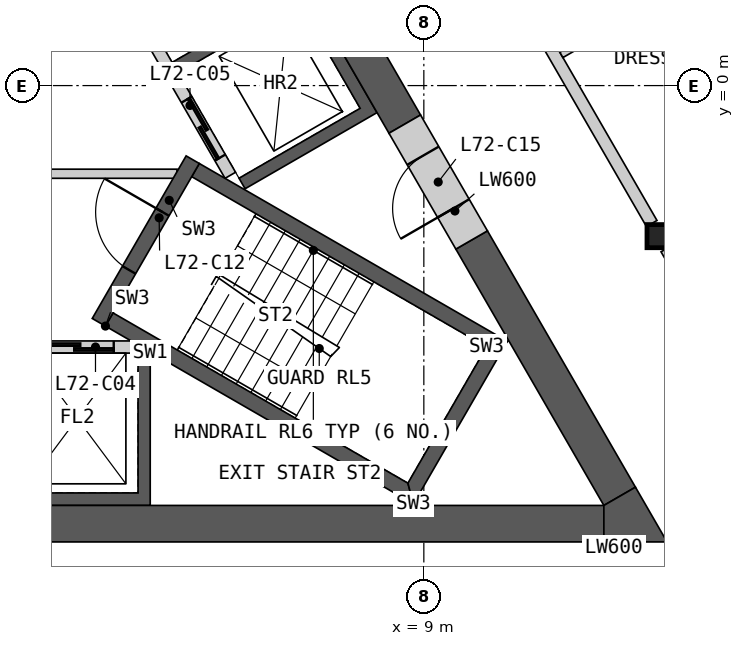
"""IFC4 building model, lengths in metres.
Left out: names, types, materials, properties, quantities, classifications, styles, units other than length and angle.
Written with IfcOpenShell. Run it as: python <this file> out.ifc"""

import sys

from ifc_helpers import new_model, si_unit, direction, frame, frame_2d, origin, origin_2d, place, context, subcontext, project, spatial, polyline, rectangle, i_section, outline, extrude, element, fill, save


model = new_model("IFC4")
c1 = context("Model", 3, precision=1e-05, world=origin(), true_north=direction((0.0, 1.0)))
c2 = subcontext(c1, "Body", "Model", "MODEL_VIEW")
j1 = project(units=[si_unit("LENGTHUNIT", "METRE"), si_unit("PLANEANGLEUNIT", "RADIAN")], contexts=[c1])
p1 = place(None, origin())
s1 = spatial("IfcSite", under=j1, at=p1, CompositionType="ELEMENT")
p2 = place(p1, origin())
s2 = spatial("IfcBuilding", under=s1, at=p2, CompositionType="ELEMENT")
p3 = place(p2, frame((0.0, 0.0, 325.6)))
s3 = spatial("IfcBuildingStorey", under=s2, at=p3, CompositionType="ELEMENT", Elevation=325.6)
p4 = place(p3, frame((12.868, -2.476, 0.0), z_axis=(0.0, 0.0, 1.0), x_axis=(1.0, 0.0, 0.0)))
e1 = element("IfcColumn", 1, at=p4, inside=s3, PredefinedType="COLUMN", context=c2, shape_type="SweptSolid", body=[
    extrude(i_section(OverallWidth=0.396, OverallDepth=0.381, WebThickness=0.019, FlangeThickness=0.03, at=origin_2d()), origin(), (0.0, 0.0, 1.0), 3.4),
])
p5 = place(p3, origin())
e2 = element("IfcWall", 2, at=p5, inside=s3, PredefinedType="SHEAR", context=c2, shape_type="SweptSolid", body=[
    extrude(outline(polyline([(4.5, -4.4), (4.5, -6.906), (-4.5, -6.906), (-4.5, -4.4), (-4.3, -4.4), (-4.3, -6.7), (-2.3, -6.7), (-2.3, -4.4), (-2.1, -4.4), (-2.1, -6.7), (-0.1, -6.7), (-0.1, -4.4), (0.1, -4.4), (0.1, -6.7), (2.1, -6.7), (2.1, -4.4), (2.3, -4.4), (2.3, -6.7), (4.3, -6.7), (4.3, -4.4), (4.5, -4.4)])), origin(), (0.0, 0.0, 1.0), 3.1),
])
p6 = place(p3, frame((-4.187, -4.3, 0.0), z_axis=(0.0, 0.0, 1.0), x_axis=(1.0, 0.0, 0.0)))
e3 = element("IfcWall", 3, at=p6, inside=s3, PredefinedType="SOLIDWALL", context=c2, shape_type="SweptSolid", body=[
    extrude(rectangle(XDim=8.373, YDim=0.2, at=frame_2d((4.187, 0.0))), origin(), (0.0, 0.0, 1.0), 3.1),
])
p7 = place(p6, frame((0.287, 0.0, 0.0)))
e4 = element("IfcOpeningElement", 4, at=p7, cuts=e3, PredefinedType="OPENING", context=c2, shape_type="SweptSolid", body=[
    extrude(rectangle(XDim=1.2, YDim=2.1, at=frame_2d((0.6, 1.05))), frame((0.0, 0.11, 0.0), z_axis=(0.0, -1.0, 0.0), x_axis=(1.0, 0.0, 0.0)), (0.0, 0.0, 1.0), 0.22),
])
p8 = place(p6, frame((2.387, 0.0, 0.0)))
e5 = element("IfcOpeningElement", 5, at=p8, cuts=e3, PredefinedType="OPENING", context=c2, shape_type="SweptSolid", body=[
    extrude(rectangle(XDim=1.4, YDim=2.1, at=frame_2d((0.7, 1.05))), frame((0.0, 0.11, 0.0), z_axis=(0.0, -1.0, 0.0), x_axis=(1.0, 0.0, 0.0)), (0.0, 0.0, 1.0), 0.22),
])
p9 = place(p6, frame((4.737, 0.0, 0.0)))
e6 = element("IfcOpeningElement", 6, at=p9, cuts=e3, PredefinedType="OPENING", context=c2, shape_type="SweptSolid", body=[
    extrude(rectangle(XDim=1.1, YDim=2.1, at=frame_2d((0.55, 1.05))), frame((0.0, 0.11, 0.0), z_axis=(0.0, -1.0, 0.0), x_axis=(1.0, 0.0, 0.0)), (0.0, 0.0, 1.0), 0.22),
])
p10 = place(p6, frame((6.887, 0.0, 0.0)))
e7 = element("IfcOpeningElement", 7, at=p10, cuts=e3, PredefinedType="OPENING", context=c2, shape_type="SweptSolid", body=[
    extrude(rectangle(XDim=1.2, YDim=2.1, at=frame_2d((0.6, 1.05))), frame((0.0, 0.11, 0.0), z_axis=(0.0, -1.0, 0.0), x_axis=(1.0, 0.0, 0.0)), (0.0, 0.0, 1.0), 0.22),
])
p11 = place(p3, origin())
e8 = element("IfcWall", 8, at=p11, inside=s3, PredefinedType="SHEAR", context=c2, shape_type="SweptSolid", body=[
    extrude(outline(polyline([(1.561, 6.097), (3.731, 7.35), (8.231, -0.444), (6.061, -1.697), (5.96, -1.524), (7.952, -0.374), (6.952, 1.358), (4.96, 0.208), (4.861, 0.381), (6.852, 1.531), (5.852, 3.263), (3.861, 2.113), (3.76, 2.287), (5.752, 3.437), (4.752, 5.169), (2.76, 4.019), (2.66, 4.192), (4.652, 5.342), (3.652, 7.074), (1.66, 5.924), (1.561, 6.097)])), origin(), (0.0, 0.0, 1.0), 3.1),
])
p12 = place(p3, frame((5.817, -1.476, 0.0), z_axis=(0.0, 0.0, 1.0), x_axis=(-0.500002616675, 0.866023893041, 0.0)))
e9 = element("IfcWall", 9, at=p12, inside=s3, PredefinedType="SOLIDWALL", context=c2, shape_type="SweptSolid", body=[
    extrude(rectangle(XDim=8.373, YDim=0.2, at=frame_2d((4.187, 0.0))), origin(), (0.0, 0.0, 1.0), 3.1),
])
p13 = place(p12, frame((0.337, 0.0, 0.0)))
e10 = element("IfcOpeningElement", 10, at=p13, cuts=e9, PredefinedType="OPENING", context=c2, shape_type="SweptSolid", body=[
    extrude(rectangle(XDim=1.1, YDim=2.1, at=frame_2d((0.55, 1.05))), frame((0.0, 0.11, 0.0), z_axis=(0.0, -1.0, 0.0), x_axis=(1.0, 0.0, 0.0)), (0.0, 0.0, 1.0), 0.22),
])
p14 = place(p12, frame((2.537, 0.0, 0.0)))
e11 = element("IfcOpeningElement", 11, at=p14, cuts=e9, PredefinedType="OPENING", context=c2, shape_type="SweptSolid", body=[
    extrude(rectangle(XDim=1.1, YDim=2.1, at=frame_2d((0.55, 1.05))), frame((0.0, 0.11, 0.0), z_axis=(0.0, -1.0, 0.0), x_axis=(1.0, 0.0, 0.0)), (0.0, 0.0, 1.0), 0.22),
])
p15 = place(p12, frame((4.737, 0.0, 0.0)))
e12 = element("IfcOpeningElement", 12, at=p15, cuts=e9, PredefinedType="OPENING", context=c2, shape_type="SweptSolid", body=[
    extrude(rectangle(XDim=1.1, YDim=2.1, at=frame_2d((0.55, 1.05))), frame((0.0, 0.11, 0.0), z_axis=(0.0, -1.0, 0.0), x_axis=(1.0, 0.0, 0.0)), (0.0, 0.0, 1.0), 0.22),
])
p16 = place(p12, frame((7.037, 0.0, 0.0)))
e13 = element("IfcOpeningElement", 13, at=p16, cuts=e9, PredefinedType="OPENING", context=c2, shape_type="SweptSolid", body=[
    extrude(rectangle(XDim=0.9, YDim=2.1, at=frame_2d((0.45, 1.05))), frame((0.0, 0.11, 0.0), z_axis=(0.0, -1.0, 0.0), x_axis=(1.0, 0.0, 0.0)), (0.0, 0.0, 1.0), 0.22),
])
p17 = place(p3, frame((-4.941, -1.45, 0.0), z_axis=(0.0, 0.0, 1.0), x_axis=(1.0, 0.0, 0.0)))
e14 = element("IfcWall", 14, at=p17, inside=s3, PredefinedType="PARTITIONING", context=c2, shape_type="SweptSolid", body=[
    extrude(rectangle(XDim=9.882, YDim=0.15, at=frame_2d((4.941, 0.0))), origin(), (0.0, 0.0, 1.0), 3.1),
])
p18 = place(p17, frame((4.391, 0.0, 0.0)))
e15 = element("IfcOpeningElement", 15, at=p18, cuts=e14, PredefinedType="OPENING", context=c2, shape_type="SweptSolid", body=[
    extrude(rectangle(XDim=1.1, YDim=2.1, at=frame_2d((0.55, 1.05))), frame((0.0, 0.085, 0.0), z_axis=(0.0, -1.0, 0.0), x_axis=(1.0, 0.0, 0.0)), (0.0, 0.0, 1.0), 0.17),
])
p19 = place(p3, origin())
e16 = element("IfcWall", 16, at=p19, inside=s3, PredefinedType="SHEAR", context=c2, shape_type="SweptSolid", body=[
    extrude(outline(polyline([(3.763, -3.956), (8.83, -6.881), (8.738, -6.539), (3.888, -3.739), (3.763, -3.956)])), origin(), (0.0, 0.0, 1.0), 3.1),
])
p20 = place(p3, origin())
e17 = element("IfcWall", 17, at=p20, inside=s3, PredefinedType="SHEAR", context=c2, shape_type="SweptSolid", body=[
    extrude(outline(polyline([(8.83, -6.881), (10.374, -4.206), (10.032, -4.298), (8.738, -6.539), (8.83, -6.881)])), origin(), (0.0, 0.0, 1.0), 3.1),
])
p21 = place(p3, origin())
e18 = element("IfcWall", 18, at=p21, inside=s3, PredefinedType="SHEAR", context=c2, shape_type="SweptSolid", body=[
    extrude(outline(polyline([(10.032, -4.298), (10.374, -4.206), (5.307, -1.281), (5.182, -1.498), (10.032, -4.298)])), origin(), (0.0, 0.0, 1.0), 3.1),
])
p22 = place(p3, frame((3.655, -3.893, 0.0), z_axis=(0.0, 0.0, 1.0), x_axis=(0.499982516597, 0.866035497597, 0.0)))
e19 = element("IfcWall", 19, at=p22, inside=s3, PredefinedType="SHEAR", context=c2, shape_type="SweptSolid", body=[
    extrude(rectangle(XDim=3.088, YDim=0.25, at=frame_2d((1.544, 0.0))), origin(), (0.0, 0.0, 1.0), 3.1),
])
p23 = place(p22, frame((0.994, 0.0, 0.0)))
e20 = element("IfcOpeningElement", 20, at=p23, cuts=e19, PredefinedType="OPENING", context=c2, shape_type="SweptSolid", body=[
    extrude(rectangle(XDim=1.1, YDim=2.1, at=frame_2d((0.55, 1.05))), frame((0.0, 0.135, 0.0), z_axis=(0.0, -1.0, 0.0), x_axis=(1.0, 0.0, 0.0)), (0.0, 0.0, 1.0), 0.27),
])
for number, where, z_axis, x_axis in (
    (21, (-4.892, -7.206, 0.0), (0.0, 0.0, 1.0), (1.0, 0.0, 0.0)),
    (22, (8.686, -0.634, 0.0), (0.0, 0.0, 1.0), (-0.5, 0.866, 0.0)),
):
    element("IfcWall", number, at=place(p3, frame(where, z_axis=z_axis, x_axis=x_axis)), inside=s3, PredefinedType="SHEAR", context=c2, shape_type="SweptSolid", body=[
        extrude(rectangle(XDim=16.853, YDim=0.6, at=frame_2d((8.426, 0.0))), origin(), (0.0, 0.0, 1.0), 3.1),
    ])
p24 = place(p3, frame((12.221, -6.756, 0.0), z_axis=(0.0, 0.0, 1.0), x_axis=(-0.50000604952, 0.866021911064, 0.0)))
e23 = element("IfcWall", 23, at=p24, inside=s3, PredefinedType="SHEAR", context=c2, shape_type="SweptSolid", body=[
    extrude(rectangle(XDim=4.869, YDim=0.6, at=frame_2d((2.434, 0.0))), origin(), (0.0, 0.0, 1.0), 3.1),
])
p25 = place(p3, origin())
e24 = element("IfcWall", 24, at=p25, inside=s3, PredefinedType="SHEAR", context=c2, shape_type="SweptSolid", body=[
    extrude(outline(polyline([(11.961, -7.506), (11.961, -6.906), (12.48, -6.606), (13.0, -7.506), (11.961, -7.506)])), origin(), (0.0, 0.0, 1.0), 3.1),
])
p26 = place(p3, frame((9.786, -2.539, 0.0), z_axis=(0.0, 0.0, 1.0), x_axis=(-0.499981787252, 0.866035918664, 0.0)))
e25 = element("IfcWall", 25, at=p26, inside=s3, PredefinedType="SHEAR", context=c2, shape_type="SweptSolid", body=[
    extrude(rectangle(XDim=2.2, YDim=0.6, at=frame_2d((1.1, 0.0))), origin(), (0.0, 0.0, 1.0), 3.1),
])
p27 = place(p26, frame((0.6, 0.0, 0.0)))
e26 = element("IfcOpeningElement", 26, at=p27, cuts=e25, PredefinedType="OPENING", context=c2, shape_type="SweptSolid", body=[
    extrude(rectangle(XDim=1.0, YDim=2.1, at=frame_2d((0.5, 1.05))), frame((0.0, 0.31, 0.0), z_axis=(0.0, -1.0, 0.0), x_axis=(1.0, 0.0, 0.0)), (0.0, 0.0, 1.0), 0.62),
])
p28 = place(p3, frame((8.698, 4.745, 0.0), z_axis=(0.0, 0.0, 1.0), x_axis=(0.499984266882, -0.866034487114, 0.0)))
e27 = element("IfcWall", 27, at=p28, inside=s3, PredefinedType="PARTITIONING", context=c2, shape_type="SweptSolid", body=[
    extrude(rectangle(XDim=8.099, YDim=0.2, at=frame_2d((4.049, 0.0))), origin(), (0.0, 0.0, 1.0), 3.1),
])
p29 = place(p28, frame((1.976, 0.0, 0.0)))
e28 = element("IfcOpeningElement", 28, at=p29, cuts=e27, PredefinedType="OPENING", context=c2, shape_type="SweptSolid", body=[
    extrude(rectangle(XDim=1.0, YDim=2.1, at=frame_2d((0.5, 1.05))), frame((0.0, 0.11, 0.0), z_axis=(0.0, -1.0, 0.0), x_axis=(1.0, 0.0, 0.0)), (0.0, 0.0, 1.0), 0.22),
])
p30 = place(p3, frame((12.988, -2.684, 0.0), z_axis=(0.0, 0.0, 1.0), x_axis=(0.49999094734, -0.866030630277, 0.0)))
e29 = element("IfcWall", 29, at=p30, inside=s3, PredefinedType="PARTITIONING", context=c2, shape_type="SweptSolid", body=[
    extrude(rectangle(XDim=4.513, YDim=0.2, at=frame_2d((2.256, 0.0))), origin(), (0.0, 0.0, 1.0), 3.1),
])
p31 = place(p30, frame((2.459, 0.0, 0.0)))
e30 = element("IfcOpeningElement", 30, at=p31, cuts=e29, PredefinedType="OPENING", context=c2, shape_type="SweptSolid", body=[
    extrude(rectangle(XDim=1.0, YDim=2.1, at=frame_2d((0.5, 1.05))), frame((0.0, 0.11, 0.0), z_axis=(0.0, -1.0, 0.0), x_axis=(1.0, 0.0, 0.0)), (0.0, 0.0, 1.0), 0.22),
])
p32 = place(p3, frame((11.262, 0.504, 0.0), z_axis=(0.0, 0.0, 1.0), x_axis=(0.866020217342, 0.500008983073, 0.0)))
e31 = element("IfcWall", 31, at=p32, inside=s3, PredefinedType="PARTITIONING", context=c2, shape_type="SweptSolid", body=[
    extrude(rectangle(XDim=7.966, YDim=0.1, at=frame_2d((3.983, 0.0))), origin(), (0.0, 0.0, 1.0), 2.33),
])
p33 = place(p32, frame((5.362, 0.0, 0.0)))
e32 = element("IfcOpeningElement", 32, at=p33, cuts=e31, PredefinedType="OPENING", context=c2, shape_type="SweptSolid", body=[
    extrude(rectangle(XDim=0.95, YDim=2.1, at=frame_2d((0.475, 1.05))), frame((0.0, 0.06, 0.0), z_axis=(0.0, -1.0, 0.0), x_axis=(1.0, 0.0, 0.0)), (0.0, 0.0, 1.0), 0.12),
])
p34 = place(p10, origin())
e33 = element("IfcDoor", 33, at=p34, inside=s3, OperationType="SLIDING_TO_LEFT", PredefinedType="DOOR", context=c2, shape_type="SweptSolid", body=[
    extrude(rectangle(XDim=1.2, YDim=2.1, at=frame_2d((0.6, 1.05))), frame((0.0, 0.025, 0.0), z_axis=(0.0, -1.0, 0.0), x_axis=(1.0, 0.0, 0.0)), (0.0, 0.0, 1.0), 0.05),
])
fill(e7, e33)
p35 = place(p13, origin())
e34 = element("IfcDoor", 34, at=p35, inside=s3, OperationType="SLIDING_TO_LEFT", PredefinedType="DOOR", context=c2, shape_type="SweptSolid", body=[
    extrude(rectangle(XDim=1.1, YDim=2.1, at=frame_2d((0.55, 1.05))), frame((0.0, 0.025, 0.0), z_axis=(0.0, -1.0, 0.0), x_axis=(1.0, 0.0, 0.0)), (0.0, 0.0, 1.0), 0.05),
])
fill(e10, e34)
p36 = place(p23, origin())
e35 = element("IfcDoor", 35, at=p36, inside=s3, OperationType="SINGLE_SWING_RIGHT", PredefinedType="DOOR", context=c2, shape_type="SweptSolid", body=[
    extrude(rectangle(XDim=1.1, YDim=2.1, at=frame_2d((0.55, 1.05))), frame((0.0, 0.025, 0.0), z_axis=(0.0, -1.0, 0.0), x_axis=(1.0, 0.0, 0.0)), (0.0, 0.0, 1.0), 0.05),
])
fill(e20, e35)
p37 = place(p27, origin())
e36 = element("IfcDoor", 36, at=p37, inside=s3, OperationType="SINGLE_SWING_LEFT", PredefinedType="DOOR", context=c2, shape_type="SweptSolid", body=[
    extrude(rectangle(XDim=1.0, YDim=2.1, at=frame_2d((0.5, 1.05))), frame((0.0, 0.055, 0.0), z_axis=(0.0, -1.0, 0.0), x_axis=(1.0, 0.0, 0.0)), (0.0, 0.0, 1.0), 0.05),
])
fill(e26, e36)
save(model, sys.argv[1])
